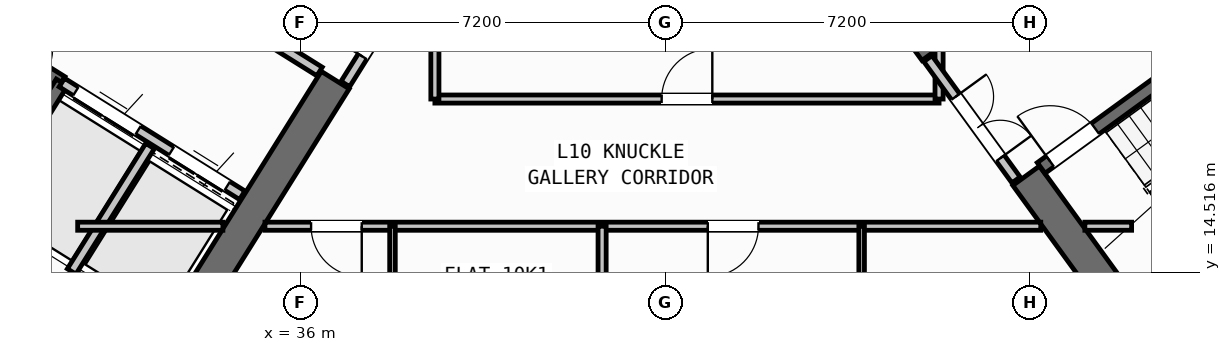
"""IFC4 building model, lengths in metres.
Left out: names, types, materials, properties, quantities, classifications, styles, units other than length and angle.
Written with IfcOpenShell. Run it as: python <this file> out.ifc"""

import sys

from ifc_helpers import new_model, si_unit, direction, frame, frame_2d, origin, place, context, subcontext, project, spatial, rectangle, extrude, source, transform, mapped, element, fill, save


model = new_model("IFC4")
c1 = context("Model", 3, precision=1e-05, world=origin(), true_north=direction((0.0, 1.0)))
c2 = subcontext(c1, "Body", "Model", "MODEL_VIEW")
j1 = project(units=[si_unit("LENGTHUNIT", "METRE"), si_unit("PLANEANGLEUNIT", "RADIAN")], contexts=[c1])
p1 = place(None, origin())
s1 = spatial("IfcSite", under=j1, at=p1, CompositionType="ELEMENT")
p2 = place(p1, origin())
s2 = spatial("IfcBuilding", under=s1, at=p2, CompositionType="ELEMENT")
p3 = place(p2, frame((0.0, 0.0, 42.0)))
s3 = spatial("IfcBuildingStorey", under=s2, at=p3, CompositionType="ELEMENT", Elevation=42.0)
p4 = place(p3, frame((33.409, 12.45, 0.0), z_axis=(0.0, 0.0, 1.0), x_axis=(-0.848051132073, 0.529914405721, 0.0)))
e1 = element("IfcWall", 1, at=p4, inside=s3, PredefinedType="SHEAR", context=c2, shape_type="SweptSolid", body=[
    extrude(rectangle(XDim=13.24, YDim=0.65, at=frame_2d((6.62, 0.0))), origin(), (0.0, 0.0, 1.0), 3.35),
])
p5 = place(p3, frame((36.683, 18.304, 0.0), z_axis=(0.0, 0.0, 1.0), x_axis=(-0.529899109053, -0.848060690178, 0.0)))
e2 = element("IfcWall", 2, at=p5, inside=s3, PredefinedType="SHEAR", context=c2, shape_type="SweptSolid", body=[
    extrude(rectangle(XDim=6.375, YDim=0.65, at=frame_2d((3.188, 0.0))), origin(), (0.0, 0.0, 1.0), 3.35),
])
p6 = place(p3, frame((52.318, 13.11, 0.0), z_axis=(0.0, 0.0, 1.0), x_axis=(0.809019445368, 0.587781878776, 0.0)))
e3 = element("IfcWall", 3, at=p6, inside=s3, PredefinedType="SHEAR", context=c2, shape_type="SweptSolid", body=[
    extrude(rectangle(XDim=12.44, YDim=0.65, at=frame_2d((6.22, 0.0))), origin(), (0.0, 0.0, 1.0), 3.35),
])
p7 = place(p3, frame((52.39, 13.564, 0.0), z_axis=(0.0, 0.0, 1.0), x_axis=(-0.58779688989, 0.809008539037, 0.0)))
e4 = element("IfcWall", 4, at=p7, inside=s3, PredefinedType="SHEAR", context=c2, shape_type="SweptSolid", body=[
    extrude(rectangle(XDim=3.525, YDim=0.65, at=frame_2d((1.763, 0.0))), origin(), (0.0, 0.0, 1.0), 3.35),
])
p8 = place(p3, frame((48.526, 18.884, 0.0), z_axis=(0.0, 0.0, 1.0), x_axis=(-0.58777996584, 0.809020835181, 0.0)))
e5 = element("IfcWall", 5, at=p8, inside=s3, PredefinedType="SHEAR", context=c2, shape_type="SweptSolid", body=[
    extrude(rectangle(XDim=6.375, YDim=0.65, at=frame_2d((3.188, 0.0))), origin(), (0.0, 0.0, 1.0), 3.35),
])
p9 = place(p3, frame((31.28, 18.261, 0.0), z_axis=(0.0, 0.0, 1.0), x_axis=(-0.848051618787, 0.529913626805, 0.0)))
e6 = element("IfcWall", 6, at=p9, inside=s3, PredefinedType="SHEAR", context=c2, shape_type="SweptSolid", body=[
    extrude(rectangle(XDim=7.46, YDim=0.26, at=frame_2d((3.73, 0.0))), origin(), (0.0, 0.0, 1.0), 3.35),
])
p10 = place(p9, frame((0.36, 0.0, 0.0)))
e7 = element("IfcOpeningElement", 7, at=p10, cuts=e6, PredefinedType="OPENING", context=c2, shape_type="SweptSolid", body=[
    extrude(rectangle(XDim=0.86, YDim=2.05, at=frame_2d((0.43, 1.025))), frame((0.0, 0.14, 0.0), z_axis=(0.0, -1.0, 0.0), x_axis=(1.0, 0.0, 0.0)), (0.0, 0.0, 1.0), 0.28),
])
p11 = place(p3, frame((31.288, 18.256, 0.0), z_axis=(0.0, 0.0, 1.0), x_axis=(-0.529943379326, -0.848033026897, 0.0)))
e8 = element("IfcWall", 8, at=p11, inside=s3, PredefinedType="SHEAR", context=c2, shape_type="SweptSolid", body=[
    extrude(rectangle(XDim=3.16, YDim=0.26, at=frame_2d((1.58, 0.0))), origin(), (0.0, 0.0, 1.0), 3.35),
])
p12 = place(p3, frame((34.848, 16.031, 0.0), z_axis=(0.0, 0.0, 1.0), x_axis=(-0.848044042236, 0.529925751807, 0.0)))
e9 = element("IfcWall", 9, at=p12, inside=s3, PredefinedType="STANDARD", context=c2, shape_type="SweptSolid", body=[
    extrude(rectangle(XDim=4.198, YDim=0.2, at=frame_2d((2.099, 0.0))), origin(), (0.0, 0.0, 1.0), 3.34),
])
p13 = place(p12, frame((0.348, 0.0, 0.0)))
e10 = element("IfcOpeningElement", 10, at=p13, cuts=e9, PredefinedType="OPENING", context=c2, shape_type="SweptSolid", body=[
    extrude(rectangle(XDim=1.3, YDim=2.2, at=frame_2d((0.65, 1.1))), frame((0.0, 0.11, 0.0), z_axis=(0.0, -1.0, 0.0), x_axis=(1.0, 0.0, 0.0)), (0.0, 0.0, 1.0), 0.22),
])
p14 = place(p12, frame((2.423, 0.0, 0.0)))
e11 = element("IfcOpeningElement", 11, at=p14, cuts=e9, PredefinedType="OPENING", context=c2, shape_type="SweptSolid", body=[
    extrude(rectangle(XDim=1.45, YDim=2.25, at=frame_2d((0.725, 1.125))), frame((0.0, 0.11, 0.0), z_axis=(0.0, -1.0, 0.0), x_axis=(1.0, 0.0, 0.0)), (0.0, 0.0, 1.0), 0.22),
])
p15 = place(p3, frame((36.374, 18.474, 0.0), z_axis=(0.0, 0.0, 1.0), x_axis=(-0.848051071577, 0.529914502535, 0.0)))
e12 = element("IfcWall", 12, at=p15, inside=s3, PredefinedType="STANDARD", context=c2, shape_type="SweptSolid", body=[
    extrude(rectangle(XDim=5.718, YDim=0.2, at=frame_2d((2.859, 0.0))), origin(), (0.0, 0.0, 1.0), 3.34),
])
p16 = place(p15, frame((2.498, 0.0, 0.0)))
e13 = element("IfcOpeningElement", 13, at=p16, cuts=e12, PredefinedType="OPENING", context=c2, shape_type="SweptSolid", body=[
    extrude(rectangle(XDim=1.15, YDim=2.1, at=frame_2d((0.575, 1.05))), frame((0.0, 0.11, 0.0), z_axis=(0.0, -1.0, 0.0), x_axis=(1.0, 0.0, 0.0)), (0.0, 0.0, 1.0), 0.22),
])
p17 = place(p3, frame((33.029, 17.003, 0.0), z_axis=(0.0, 0.0, 1.0), x_axis=(-0.529916267533, -0.848049968695, 0.0)))
e14 = element("IfcWall", 14, at=p17, inside=s3, PredefinedType="STANDARD", context=c2, shape_type="SweptSolid", body=[
    extrude(rectangle(XDim=2.92, YDim=0.2, at=frame_2d((1.46, 0.0))), origin(), (0.0, 0.0, 1.0), 3.34),
])
p18 = place(p3, frame((52.472, 14.013, 0.0), z_axis=(0.0, 0.0, 1.0), x_axis=(0.809028366311, 0.587769599847, 0.0)))
e15 = element("IfcWall", 15, at=p18, inside=s3, PredefinedType="SHEAR", context=c2, shape_type="SweptSolid", body=[
    extrude(rectangle(XDim=7.33, YDim=0.26, at=frame_2d((3.665, 0.0))), origin(), (0.0, 0.0, 1.0), 3.35),
])
p19 = place(p3, frame((50.615, 16.57, 0.0), z_axis=(0.0, 0.0, 1.0), x_axis=(0.809028366311, 0.587769599847, 0.0)))
e16 = element("IfcWall", 16, at=p19, inside=s3, PredefinedType="SHEAR", context=c2, shape_type="SweptSolid", body=[
    extrude(rectangle(XDim=7.33, YDim=0.26, at=frame_2d((3.665, 0.0))), origin(), (0.0, 0.0, 1.0), 3.35),
])
p20 = place(p19, frame((0.22, 0.0, 0.0)))
e17 = element("IfcOpeningElement", 17, at=p20, cuts=e16, PredefinedType="OPENING", context=c2, shape_type="SweptSolid", body=[
    extrude(rectangle(XDim=1.1, YDim=2.1, at=frame_2d((0.55, 1.05))), frame((0.0, 0.14, 0.0), z_axis=(0.0, -1.0, 0.0), x_axis=(1.0, 0.0, 0.0)), (0.0, 0.0, 1.0), 0.28),
])
p21 = place(p3, frame((32.164, 10.374, 0.0), z_axis=(0.0, 0.0, 1.0), x_axis=(-0.848044107957, 0.529925646633, 0.0)))
e18 = element("IfcWall", 18, at=p21, inside=s3, PredefinedType="PARTITIONING", context=c2, shape_type="SweptSolid", body=[
    extrude(rectangle(XDim=15.57, YDim=0.16, at=frame_2d((7.785, 0.0))), origin(), (0.0, 0.0, 1.0), 3.34),
])
p22 = place(p21, frame((10.83, 0.0, 0.0)))
e19 = element("IfcOpeningElement", 19, at=p22, cuts=e18, PredefinedType="OPENING", context=c2, shape_type="SweptSolid", body=[
    extrude(rectangle(XDim=1.0, YDim=2.1, at=frame_2d((0.5, 1.05))), frame((0.0, 0.09, 0.0), z_axis=(0.0, -1.0, 0.0), x_axis=(1.0, 0.0, 0.0)), (0.0, 0.0, 1.0), 0.18),
])
p23 = place(p3, frame((38.451, 20.737, 0.0), z_axis=(0.0, 0.0, 1.0), x_axis=(-0.529924799939, -0.848044637038, 0.0)))
e20 = element("IfcWall", 20, at=p23, inside=s3, PredefinedType="STANDARD", context=c2, shape_type="SweptSolid", body=[
    extrude(rectangle(XDim=2.96, YDim=0.2, at=frame_2d((1.48, 0.0))), origin(), (0.0, 0.0, 1.0), 3.34),
])
p24 = place(p23, frame((1.46, 0.0, 0.0)))
e21 = element("IfcOpeningElement", 21, at=p24, cuts=e20, PredefinedType="OPENING", context=c2, shape_type="SweptSolid", body=[
    extrude(rectangle(XDim=0.86, YDim=2.05, at=frame_2d((0.43, 1.025))), frame((0.0, 0.11, 0.0), z_axis=(0.0, -1.0, 0.0), x_axis=(1.0, 0.0, 0.0)), (0.0, 0.0, 1.0), 0.22),
])
p25 = place(p3, frame((31.6, 15.42, 0.0), z_axis=(0.0, 0.0, 1.0), x_axis=(1.0, 0.0, 0.0)))
e22 = element("IfcWall", 22, at=p25, inside=s3, PredefinedType="PARTITIONING", context=c2, shape_type="SweptSolid", body=[
    extrude(rectangle(XDim=2.866, YDim=0.16, at=frame_2d((1.433, 0.0))), origin(), (0.0, 0.0, 1.0), 3.34),
])
p26 = place(p3, frame((35.296, 15.42, 0.0), z_axis=(0.0, 0.0, 1.0), x_axis=(1.0, 0.0, 0.0)))
e23 = element("IfcWall", 23, at=p26, inside=s3, PredefinedType="PARTITIONING", context=c2, shape_type="SweptSolid", body=[
    extrude(rectangle(XDim=15.311, YDim=0.16, at=frame_2d((7.655, 0.0))), origin(), (0.0, 0.0, 1.0), 3.34),
])
p27 = place(p26, frame((0.91, 0.0, 0.0)))
e24 = element("IfcOpeningElement", 24, at=p27, cuts=e23, PredefinedType="OPENING", context=c2, shape_type="SweptSolid", body=[
    extrude(rectangle(XDim=1.0, YDim=2.1, at=frame_2d((0.5, 1.05))), frame((0.0, 0.09, 0.0), z_axis=(0.0, -1.0, 0.0), x_axis=(1.0, 0.0, 0.0)), (0.0, 0.0, 1.0), 0.18),
])
p28 = place(p26, frame((8.74, 0.0, 0.0)))
e25 = element("IfcOpeningElement", 25, at=p28, cuts=e23, PredefinedType="OPENING", context=c2, shape_type="SweptSolid", body=[
    extrude(rectangle(XDim=1.0, YDim=2.1, at=frame_2d((0.5, 1.05))), frame((0.0, 0.09, 0.0), z_axis=(0.0, -1.0, 0.0), x_axis=(1.0, 0.0, 0.0)), (0.0, 0.0, 1.0), 0.18),
])
p29 = place(p3, frame((51.477, 15.42, 0.0), z_axis=(0.0, 0.0, 1.0), x_axis=(1.0, 0.0, 0.0)))
e26 = element("IfcWall", 26, at=p29, inside=s3, PredefinedType="PARTITIONING", context=c2, shape_type="SweptSolid", body=[
    extrude(rectangle(XDim=0.923, YDim=0.16, at=frame_2d((0.461, 0.0))), origin(), (0.0, 0.0, 1.0), 3.34),
])
p30 = place(p3, frame((38.65, 17.93, 0.0), z_axis=(0.0, 0.0, 1.0), x_axis=(1.0, 0.0, 0.0)))
e27 = element("IfcWall", 27, at=p30, inside=s3, PredefinedType="PARTITIONING", context=c2, shape_type="SweptSolid", body=[
    extrude(rectangle(XDim=9.95, YDim=0.16, at=frame_2d((4.975, 0.0))), origin(), (0.0, 0.0, 1.0), 3.34),
])
p31 = place(p30, frame((4.475, 0.0, 0.0)))
e28 = element("IfcOpeningElement", 28, at=p31, cuts=e27, PredefinedType="OPENING", context=c2, shape_type="SweptSolid", body=[
    extrude(rectangle(XDim=1.0, YDim=2.1, at=frame_2d((0.5, 1.05))), frame((0.0, 0.09, 0.0), z_axis=(0.0, -1.0, 0.0), x_axis=(1.0, 0.0, 0.0)), (0.0, 0.0, 1.0), 0.18),
])
p32 = place(p3, frame((38.65, 17.93, 0.0), z_axis=(0.0, 0.0, 1.0), x_axis=(0.0, 1.0, 0.0)))
e29 = element("IfcWall", 29, at=p32, inside=s3, PredefinedType="PARTITIONING", context=c2, shape_type="SweptSolid", body=[
    extrude(rectangle(XDim=2.857, YDim=0.16, at=frame_2d((1.428, 0.0))), origin(), (0.0, 0.0, 1.0), 3.34),
])
p33 = place(p3, frame((48.6, 17.93, 0.0), z_axis=(0.0, 0.0, 1.0), x_axis=(0.0, 1.0, 0.0)))
e30 = element("IfcWall", 30, at=p33, inside=s3, PredefinedType="PARTITIONING", context=c2, shape_type="SweptSolid", body=[
    extrude(rectangle(XDim=0.993, YDim=0.16, at=frame_2d((0.496, 0.0))), origin(), (0.0, 0.0, 1.0), 3.34),
])
p34 = place(p3, frame((50.119, 16.333, 0.0), z_axis=(0.0, 0.0, 1.0), x_axis=(-0.587749856981, 0.809042709391, 0.0)))
e31 = element("IfcWall", 31, at=p34, inside=s3, PredefinedType="STANDARD", context=c2, shape_type="SweptSolid", body=[
    extrude(rectangle(XDim=2.96, YDim=0.2, at=frame_2d((1.48, 0.0))), origin(), (0.0, 0.0, 1.0), 3.34),
])
p35 = place(p34, frame((0.53, 0.0, 0.0)))
e32 = element("IfcOpeningElement", 32, at=p35, cuts=e31, PredefinedType="OPENING", context=c2, shape_type="SweptSolid", body=[
    extrude(rectangle(XDim=1.5, YDim=2.15, at=frame_2d((0.75, 1.075))), frame((0.0, 0.11, 0.0), z_axis=(0.0, -1.0, 0.0), x_axis=(1.0, 0.0, 0.0)), (0.0, 0.0, 1.0), 0.22),
])
p36 = place(p3, frame((41.95, 1.96, 0.0), z_axis=(0.0, 0.0, 1.0), x_axis=(0.0, 1.0, 0.0)))
e33 = element("IfcWall", 33, at=p36, inside=s3, PredefinedType="PARTITIONING", context=c2, shape_type="SweptSolid", body=[
    extrude(rectangle(XDim=13.46, YDim=0.16, at=frame_2d((6.73, 0.0))), origin(), (0.0, 0.0, 1.0), 3.34),
])
p37 = place(p3, frame((37.813, 1.96, 0.0), z_axis=(0.0, 0.0, 1.0), x_axis=(0.0, 1.0, 0.0)))
e34 = element("IfcWall", 34, at=p37, inside=s3, PredefinedType="PARTITIONING", context=c2, shape_type="SweptSolid", body=[
    extrude(rectangle(XDim=13.46, YDim=0.11, at=frame_2d((6.73, 0.0))), origin(), (0.0, 0.0, 1.0), 3.34),
])
p38 = place(p37, frame((5.5, 0.0, 0.0)))
e35 = element("IfcOpeningElement", 35, at=p38, cuts=e34, PredefinedType="OPENING", context=c2, shape_type="SweptSolid", body=[
    extrude(rectangle(XDim=0.92, YDim=2.08, at=frame_2d((0.46, 1.04))), frame((0.0, 0.065, 0.0), z_axis=(0.0, -1.0, 0.0), x_axis=(1.0, 0.0, 0.0)), (0.0, 0.0, 1.0), 0.13),
])
p39 = place(p37, frame((10.67, 0.0, 0.0)))
e36 = element("IfcOpeningElement", 36, at=p39, cuts=e34, PredefinedType="OPENING", context=c2, shape_type="SweptSolid", body=[
    extrude(rectangle(XDim=0.88, YDim=2.08, at=frame_2d((0.44, 1.04))), frame((0.0, 0.065, 0.0), z_axis=(0.0, -1.0, 0.0), x_axis=(1.0, 0.0, 0.0)), (0.0, 0.0, 1.0), 0.13),
])
p40 = place(p3, frame((47.072, 1.96, 0.0), z_axis=(0.0, 0.0, 1.0), x_axis=(0.0, 1.0, 0.0)))
e37 = element("IfcWall", 37, at=p40, inside=s3, PredefinedType="PARTITIONING", context=c2, shape_type="SweptSolid", body=[
    extrude(rectangle(XDim=13.46, YDim=0.11, at=frame_2d((6.73, 0.0))), origin(), (0.0, 0.0, 1.0), 3.34),
])
p41 = place(p40, frame((6.6, 0.0, 0.0)))
e38 = element("IfcOpeningElement", 38, at=p41, cuts=e37, PredefinedType="OPENING", context=c2, shape_type="SweptSolid", body=[
    extrude(rectangle(XDim=0.92, YDim=2.08, at=frame_2d((0.46, 1.04))), frame((0.0, 0.065, 0.0), z_axis=(0.0, -1.0, 0.0), x_axis=(1.0, 0.0, 0.0)), (0.0, 0.0, 1.0), 0.13),
])
p42 = place(p40, frame((11.32, 0.0, 0.0)))
e39 = element("IfcOpeningElement", 39, at=p42, cuts=e37, PredefinedType="OPENING", context=c2, shape_type="SweptSolid", body=[
    extrude(rectangle(XDim=0.88, YDim=2.08, at=frame_2d((0.44, 1.04))), frame((0.0, 0.065, 0.0), z_axis=(0.0, -1.0, 0.0), x_axis=(1.0, 0.0, 0.0)), (0.0, 0.0, 1.0), 0.13),
])
m1 = source(origin(), c2, "Body", "SweptSolid", [
    extrude(rectangle(XDim=1.3, YDim=2.2, at=frame_2d((0.65, 1.1))), frame((0.0, 0.025, 0.0), z_axis=(0.0, -1.0, 0.0), x_axis=(1.0, 0.0, 0.0)), (0.0, 0.0, 1.0), 0.05),
])
p43 = place(p13, origin())
e40 = element("IfcDoor", 40, at=p43, inside=s3, OperationType="DOUBLE_DOOR_SLIDING", PredefinedType="DOOR", context=c2, shape_type="MappedRepresentation", body=[
    mapped(m1, transform((0.0, 0.0, 0.0), scale=1.0)),
])
fill(e10, e40)
m2 = source(origin(), c2, "Body", "SweptSolid", [
    extrude(rectangle(XDim=1.45, YDim=2.25, at=frame_2d((0.725, 1.125))), frame((0.0, 0.025, 0.0), z_axis=(0.0, -1.0, 0.0), x_axis=(1.0, 0.0, 0.0)), (0.0, 0.0, 1.0), 0.05),
])
p44 = place(p14, origin())
e41 = element("IfcDoor", 41, at=p44, inside=s3, OperationType="DOUBLE_DOOR_SLIDING", PredefinedType="DOOR", context=c2, shape_type="MappedRepresentation", body=[
    mapped(m2, transform((0.0, 0.0, 0.0), scale=1.0)),
])
fill(e11, e41)
m3 = source(origin(), c2, "Body", "SweptSolid", [
    extrude(rectangle(XDim=1.1, YDim=2.1, at=frame_2d((0.55, 1.05))), frame((0.0, 0.025, 0.0), z_axis=(0.0, -1.0, 0.0), x_axis=(1.0, 0.0, 0.0)), (0.0, 0.0, 1.0), 0.05),
])
p45 = place(p20, origin())
e42 = element("IfcDoor", 42, at=p45, inside=s3, OperationType="SINGLE_SWING_LEFT", PredefinedType="DOOR", context=c2, shape_type="MappedRepresentation", body=[
    mapped(m3, transform((0.0, 0.0, 0.0), scale=1.0)),
])
fill(e17, e42)
m4 = source(origin(), c2, "Body", "SweptSolid", [
    extrude(rectangle(XDim=1.0, YDim=2.1, at=frame_2d((0.5, 1.05))), frame((0.0, 0.025, 0.0), z_axis=(0.0, -1.0, 0.0), x_axis=(1.0, 0.0, 0.0)), (0.0, 0.0, 1.0), 0.05),
])
p46 = place(p31, origin())
e43 = element("IfcDoor", 43, at=p46, inside=s3, OperationType="SINGLE_SWING_RIGHT", PredefinedType="DOOR", context=c2, shape_type="MappedRepresentation", body=[
    mapped(m4, transform((0.0, 0.0, 0.0), scale=1.0)),
])
fill(e28, e43)
m5 = source(origin(), c2, "Body", "SweptSolid", [
    extrude(rectangle(XDim=0.86, YDim=2.05, at=frame_2d((0.43, 1.025))), frame((0.0, 0.025, 0.0), z_axis=(0.0, -1.0, 0.0), x_axis=(1.0, 0.0, 0.0)), (0.0, 0.0, 1.0), 0.05),
])
p47 = place(p24, frame((0.86, 0.0, 0.0), z_axis=(0.0, 0.0, 1.0), x_axis=(-1.0, 0.0, 0.0)))
e44 = element("IfcDoor", 44, at=p47, inside=s3, OperationType="SINGLE_SWING_LEFT", PredefinedType="DOOR", context=c2, shape_type="MappedRepresentation", body=[
    mapped(m5, transform((0.0, 0.0, 0.0), scale=1.0)),
])
fill(e21, e44)
m6 = source(origin(), c2, "Body", "SweptSolid", [
    extrude(rectangle(XDim=1.5, YDim=2.15, at=frame_2d((0.75, 1.075))), frame((0.0, 0.025, 0.0), z_axis=(0.0, -1.0, 0.0), x_axis=(1.0, 0.0, 0.0)), (0.0, 0.0, 1.0), 0.05),
])
p48 = place(p35, frame((1.5, 0.0, 0.0), z_axis=(0.0, 0.0, 1.0), x_axis=(-1.0, 0.0, 0.0)))
e45 = element("IfcDoor", 45, at=p48, inside=s3, OperationType="DOUBLE_DOOR_SINGLE_SWING", PredefinedType="DOOR", context=c2, shape_type="MappedRepresentation", body=[
    mapped(m6, transform((0.0, 0.0, 0.0), scale=1.0)),
])
fill(e32, e45)
p49 = place(p27, frame((1.0, 0.0, 0.0), z_axis=(0.0, 0.0, 1.0), x_axis=(-1.0, 0.0, 0.0)))
e46 = element("IfcDoor", 46, at=p49, inside=s3, OperationType="SINGLE_SWING_LEFT", PredefinedType="DOOR", context=c2, shape_type="MappedRepresentation", body=[
    mapped(m4, transform((0.0, 0.0, 0.0), scale=1.0)),
])
fill(e24, e46)
p50 = place(p28, frame((1.0, 0.0, 0.0), z_axis=(0.0, 0.0, 1.0), x_axis=(-1.0, 0.0, 0.0)))
e47 = element("IfcDoor", 47, at=p50, inside=s3, OperationType="SINGLE_SWING_RIGHT", PredefinedType="DOOR", context=c2, shape_type="MappedRepresentation", body=[
    mapped(m4, transform((0.0, 0.0, 0.0), scale=1.0)),
])
fill(e25, e47)
save(model, sys.argv[1])
